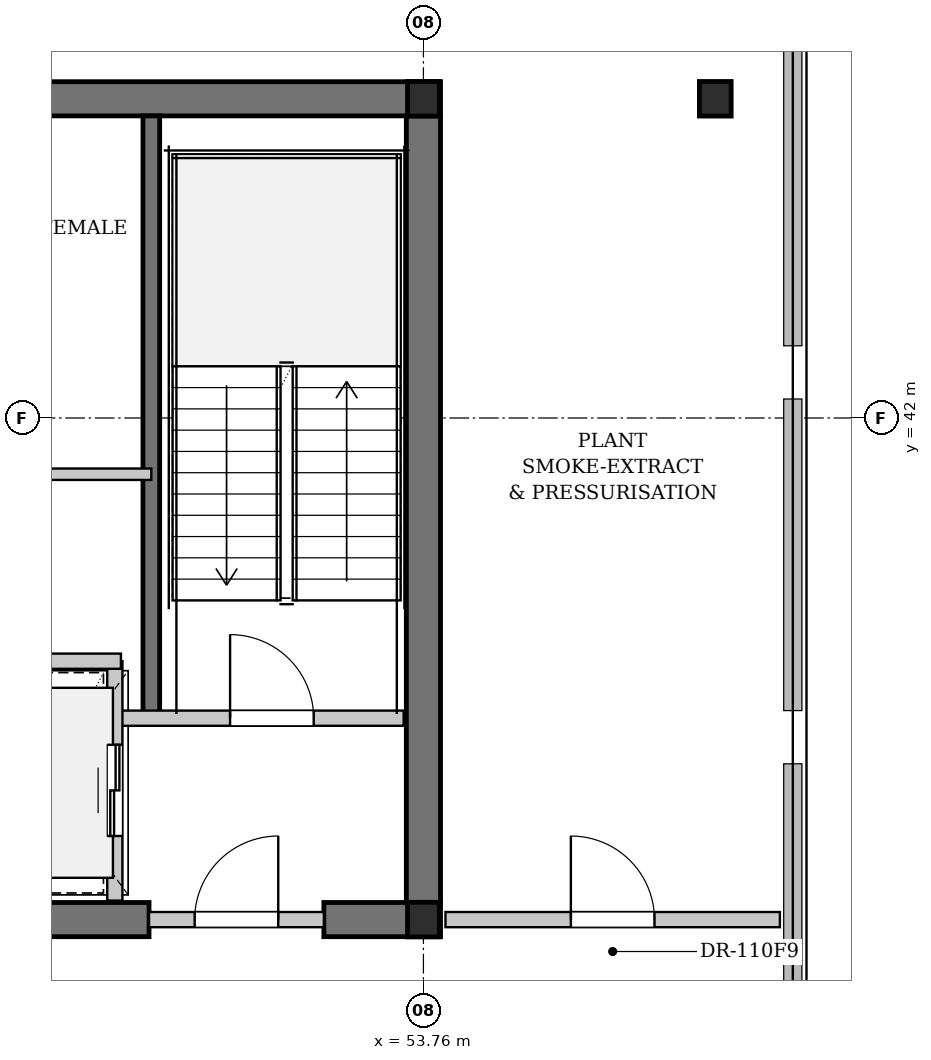
"""IFC4 building model, lengths in metres.
Left out: names, types, materials, properties, quantities, classifications, styles, units other than length and angle.
Written with IfcOpenShell. Run it as: python <this file> out.ifc"""

import sys

from ifc_helpers import new_model, si_unit, direction, frame, frame_2d, origin, origin_2d, place, context, subcontext, project, spatial, rectangle, i_section, extrude, element, fill, save


model = new_model("IFC4")
c1 = context("Model", 3, precision=1e-05, world=origin(), true_north=direction((0.0, 1.0)))
c2 = subcontext(c1, "Body", "Model", "MODEL_VIEW")
j1 = project(units=[si_unit("LENGTHUNIT", "METRE"), si_unit("PLANEANGLEUNIT", "RADIAN")], contexts=[c1])
p1 = place(None, origin())
s1 = spatial("IfcSite", under=j1, at=p1, CompositionType="ELEMENT")
p2 = place(p1, origin())
s2 = spatial("IfcBuilding", under=s1, at=p2, CompositionType="ELEMENT")
p3 = place(p2, frame((0.0, 0.0, 191.9)))
s3 = spatial("IfcBuildingStorey", under=s2, at=p3, CompositionType="ELEMENT", Elevation=191.9)
p4 = place(p3, frame((22.815, 46.2, 0.0), z_axis=(0.0, 0.0, 1.0), x_axis=(1.0, 0.0, 0.0)))
e1 = element("IfcWall", 1, at=p4, inside=s3, PredefinedType="SHEAR", context=c2, shape_type="SweptSolid", body=[
    extrude(rectangle(XDim=31.17, YDim=0.45, at=frame_2d((15.585, 0.0))), origin(), (0.0, 0.0, 1.0), 3.98),
])
p5 = place(p3, frame((42.1, 35.4, 0.0), z_axis=(0.0, 0.0, 1.0), x_axis=(1.0, 0.0, 0.0)))
e2 = element("IfcWall", 2, at=p5, inside=s3, PredefinedType="SHEAR", context=c2, shape_type="SweptSolid", body=[
    extrude(rectangle(XDim=8.05, YDim=0.45, at=frame_2d((4.025, 0.0))), origin(), (0.0, 0.0, 1.0), 3.98),
])
p6 = place(p5, frame((4.85, 0.0, 0.0)))
e3 = element("IfcOpeningElement", 3, at=p6, cuts=e2, PredefinedType="OPENING", context=c2, shape_type="SweptSolid", body=[
    extrude(rectangle(XDim=0.9, YDim=2.15, at=frame_2d((0.45, 1.075))), frame((0.0, 0.235, 0.0), z_axis=(0.0, -1.0, 0.0), x_axis=(1.0, 0.0, 0.0)), (0.0, 0.0, 1.0), 0.47),
])
p7 = place(p3, frame((52.45, 35.4, 0.0), z_axis=(0.0, 0.0, 1.0), x_axis=(1.0, 0.0, 0.0)))
e4 = element("IfcWall", 4, at=p7, inside=s3, PredefinedType="SHEAR", context=c2, shape_type="SweptSolid", body=[
    extrude(rectangle(XDim=1.535, YDim=0.45, at=frame_2d((0.768, 0.0))), origin(), (0.0, 0.0, 1.0), 3.98),
])
p8 = place(p3, frame((53.76, 35.625, 0.0), z_axis=(0.0, 0.0, 1.0), x_axis=(0.0, 1.0, 0.0)))
e5 = element("IfcWall", 5, at=p8, inside=s3, PredefinedType="SHEAR", context=c2, shape_type="SweptSolid", body=[
    extrude(rectangle(XDim=10.35, YDim=0.45, at=frame_2d((5.175, 0.0))), origin(), (0.0, 0.0, 1.0), 3.98),
])
p9 = place(p3, frame((50.18, 38.05, 0.0), z_axis=(0.0, 0.0, 1.0), x_axis=(0.0, 1.0, 0.0)))
e6 = element("IfcWall", 6, at=p9, inside=s3, PredefinedType="SHEAR", context=c2, shape_type="SweptSolid", body=[
    extrude(rectangle(XDim=7.925, YDim=0.22, at=frame_2d((3.962, 0.0))), origin(), (0.0, 0.0, 1.0), 3.98),
])
for number, where, z_axis, x_axis in (
    (7, (53.76, 35.4, 0.0), (0.0, 0.0, 1.0), (1.0, 0.0, 0.0)),
    (8, (53.76, 46.2, 0.0), (0.0, 0.0, 1.0), (1.0, 0.0, 0.0)),
    (9, (57.6, 46.2, 0.0), (0.0, 0.0, 1.0), (1.0, 0.0, 0.0)),
):
    element("IfcColumn", number, at=place(p3, frame(where, z_axis=z_axis, x_axis=x_axis)), inside=s3, PredefinedType="COLUMN", context=c2, shape_type="SweptSolid", body=[
        extrude(i_section(OverallWidth=0.418, OverallDepth=0.455, WebThickness=0.042, FlangeThickness=0.068, FilletRadius=0.015, at=origin_2d()), origin(), (0.0, 0.0, 1.0), 4.2),
    ])
p10 = place(p3, frame((49.78, 38.05, 0.0), z_axis=(0.0, 0.0, 1.0), x_axis=(1.0, 0.0, 0.0)))
e10 = element("IfcWall", 10, at=p10, inside=s3, PredefinedType="PARTITIONING", context=c2, shape_type="SweptSolid", body=[
    extrude(rectangle(XDim=3.72, YDim=0.2, at=frame_2d((1.86, 0.0))), origin(), (0.0, 0.0, 1.0), 3.98),
])
p11 = place(p10, frame((1.436, 0.0, 0.0)))
e11 = element("IfcOpeningElement", 11, at=p11, cuts=e10, PredefinedType="OPENING", context=c2, shape_type="SweptSolid", body=[
    extrude(rectangle(XDim=1.1, YDim=2.15, at=frame_2d((0.55, 1.075))), frame((0.0, 0.11, 0.0), z_axis=(0.0, -1.0, 0.0), x_axis=(1.0, 0.0, 0.0)), (0.0, 0.0, 1.0), 0.22),
])
p12 = place(p3, frame((50.15, 35.4, 0.0), z_axis=(0.0, 0.0, 1.0), x_axis=(1.0, 0.0, 0.0)))
e12 = element("IfcWall", 12, at=p12, inside=s3, PredefinedType="PARTITIONING", context=c2, shape_type="SweptSolid", body=[
    extrude(rectangle(XDim=2.3, YDim=0.2, at=frame_2d((1.15, 0.0))), origin(), (0.0, 0.0, 1.0), 3.161),
])
p13 = place(p12, frame((0.6, 0.0, 0.0)))
e13 = element("IfcOpeningElement", 13, at=p13, cuts=e12, PredefinedType="OPENING", context=c2, shape_type="SweptSolid", body=[
    extrude(rectangle(XDim=1.1, YDim=2.15, at=frame_2d((0.55, 1.075))), frame((0.0, 0.11, 0.0), z_axis=(0.0, -1.0, 0.0), x_axis=(1.0, 0.0, 0.0)), (0.0, 0.0, 1.0), 0.22),
])
p14 = place(p3, frame((49.7, 35.65, 0.0), z_axis=(0.0, 0.0, 1.0), x_axis=(0.0, 1.0, 0.0)))
e14 = element("IfcWall", 14, at=p14, inside=s3, PredefinedType="PARTITIONING", context=c2, shape_type="SweptSolid", body=[
    extrude(rectangle(XDim=3.15, YDim=0.2, at=frame_2d((1.575, 0.0))), origin(), (0.0, 0.0, 1.0), 3.98),
])
p15 = place(p14, frame((0.85, 0.0, 0.0)))
e15 = element("IfcOpeningElement", 15, at=p15, cuts=e14, PredefinedType="OPENING", context=c2, shape_type="SweptSolid", body=[
    extrude(rectangle(XDim=1.2, YDim=2.2, at=frame_2d((0.6, 1.1))), frame((0.0, 0.11, 0.0), z_axis=(0.0, -1.0, 0.0), x_axis=(1.0, 0.0, 0.0)), (0.0, 0.0, 1.0), 0.22),
])
p16 = place(p3, frame((47.92, 38.8, 0.0), z_axis=(0.0, 0.0, 1.0), x_axis=(1.0, 0.0, 0.0)))
e16 = element("IfcWall", 16, at=p16, inside=s3, PredefinedType="PARTITIONING", context=c2, shape_type="SweptSolid", body=[
    extrude(rectangle(XDim=1.86, YDim=0.2, at=frame_2d((0.93, 0.0))), origin(), (0.0, 0.0, 1.0), 3.98),
])
p17 = place(p3, frame((47.88, 41.26, 0.0), z_axis=(0.0, 0.0, 1.0), x_axis=(1.0, 0.0, 0.0)))
e17 = element("IfcWall", 17, at=p17, inside=s3, PredefinedType="PARTITIONING", context=c2, shape_type="SweptSolid", body=[
    extrude(rectangle(XDim=2.3, YDim=0.15, at=frame_2d((1.15, 0.0))), origin(), (0.0, 0.0, 1.0), 3.98),
])
p18 = place(p3, frame((54.05, 35.4, 0.0), z_axis=(0.0, 0.0, 1.0), x_axis=(1.0, 0.0, 0.0)))
e18 = element("IfcWall", 18, at=p18, inside=s3, PredefinedType="PARTITIONING", context=c2, shape_type="SweptSolid", body=[
    extrude(rectangle(XDim=4.4, YDim=0.2, at=frame_2d((2.2, 0.0))), origin(), (0.0, 0.0, 1.0), 3.98),
])
p19 = place(p18, frame((1.65, 0.0, 0.0)))
e19 = element("IfcOpeningElement", 19, at=p19, cuts=e18, PredefinedType="OPENING", context=c2, shape_type="SweptSolid", body=[
    extrude(rectangle(XDim=1.1, YDim=2.15, at=frame_2d((0.55, 1.075))), frame((0.0, 0.11, 0.0), z_axis=(0.0, -1.0, 0.0), x_axis=(1.0, 0.0, 0.0)), (0.0, 0.0, 1.0), 0.22),
])
p20 = place(p11, origin())
e20 = element("IfcDoor", 20, at=p20, inside=s3, OperationType="SINGLE_SWING_LEFT", PredefinedType="DOOR", context=c2, shape_type="SweptSolid", body=[
    extrude(rectangle(XDim=1.1, YDim=2.15, at=frame_2d((0.55, 1.075))), frame((0.0, 0.025, 0.0), z_axis=(0.0, -1.0, 0.0), x_axis=(1.0, 0.0, 0.0)), (0.0, 0.0, 1.0), 0.05),
])
fill(e11, e20)
p21 = place(p13, origin())
e21 = element("IfcDoor", 21, at=p21, inside=s3, OperationType="SINGLE_SWING_RIGHT", PredefinedType="DOOR", context=c2, shape_type="SweptSolid", body=[
    extrude(rectangle(XDim=1.1, YDim=2.15, at=frame_2d((0.55, 1.075))), frame((0.0, 0.025, 0.0), z_axis=(0.0, -1.0, 0.0), x_axis=(1.0, 0.0, 0.0)), (0.0, 0.0, 1.0), 0.05),
])
fill(e13, e21)
p22 = place(p15, origin())
e22 = element("IfcDoor", 22, at=p22, inside=s3, OperationType="DOUBLE_DOOR_SLIDING", PredefinedType="DOOR", context=c2, shape_type="SweptSolid", body=[
    extrude(rectangle(XDim=1.2, YDim=2.2, at=frame_2d((0.6, 1.1))), frame((0.0, 0.025, 0.0), z_axis=(0.0, -1.0, 0.0), x_axis=(1.0, 0.0, 0.0)), (0.0, 0.0, 1.0), 0.05),
])
fill(e15, e22)
p23 = place(p19, origin())
e23 = element("IfcDoor", 23, at=p23, inside=s3, OperationType="SINGLE_SWING_LEFT", PredefinedType="DOOR", context=c2, shape_type="SweptSolid", body=[
    extrude(rectangle(XDim=1.1, YDim=2.15, at=frame_2d((0.55, 1.075))), frame((0.0, 0.025, 0.0), z_axis=(0.0, -1.0, 0.0), x_axis=(1.0, 0.0, 0.0)), (0.0, 0.0, 1.0), 0.05),
])
fill(e19, e23)
save(model, sys.argv[1])
